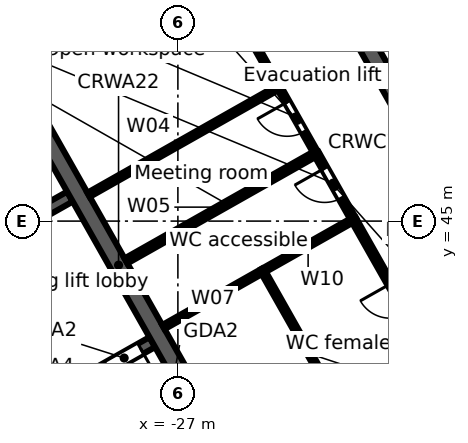
"""IFC4 building model, lengths in metres.
Left out: names, types, materials, properties, quantities, classifications, styles, units other than length and angle.
Written with IfcOpenShell. Run it as: python <this file> out.ifc"""

import sys

from ifc_helpers import new_model, si_unit, direction, frame, frame_2d, origin, place, context, subcontext, project, spatial, rectangle, extrude, element, fill, save


model = new_model("IFC4")
c1 = context("Model", 3, precision=1e-05, world=origin(), true_north=direction((0.0, 1.0)))
c2 = subcontext(c1, "Body", "Model", "MODEL_VIEW")
j1 = project(units=[si_unit("LENGTHUNIT", "METRE"), si_unit("PLANEANGLEUNIT", "RADIAN")], contexts=[c1])
p1 = place(None, origin())
s1 = spatial("IfcSite", under=j1, at=p1, CompositionType="ELEMENT")
p2 = place(p1, origin())
s2 = spatial("IfcBuilding", under=s1, at=p2, CompositionType="ELEMENT")
p3 = place(p2, frame((0.0, 0.0, 211.4)))
s3 = spatial("IfcBuildingStorey", under=s2, at=p3, CompositionType="ELEMENT", Elevation=211.4)
p4 = place(p3, frame((-0.046, 47.974, 0.0), z_axis=(0.0, 0.0, 1.0), x_axis=(-0.870356579543, -0.492421998337, 0.0)))
e1 = element("IfcWall", 1, at=p4, inside=s3, PredefinedType="STANDARD", context=c2, shape_type="SweptSolid", body=[
    extrude(rectangle(XDim=43.754, YDim=0.25, at=frame_2d((21.877, 0.0))), origin(), (0.0, 0.0, 1.0), 3.62),
])
p5 = place(p4, frame((41.061, 0.0, 0.8)))
e2 = element("IfcOpeningElement", 2, at=p5, cuts=e1, PredefinedType="OPENING", context=c2, shape_type="SweptSolid", body=[
    extrude(rectangle(XDim=2.4, YDim=2.2, at=frame_2d((1.2, 1.1))), frame((0.0, 0.135, 0.0), z_axis=(0.0, -1.0, 0.0), x_axis=(1.0, 0.0, 0.0)), (0.0, 0.0, 1.0), 0.27),
])
p6 = place(p4, frame((38.443, 0.0, 0.0)))
e3 = element("IfcOpeningElement", 3, at=p6, cuts=e1, PredefinedType="OPENING", context=c2, shape_type="SweptSolid", body=[
    extrude(rectangle(XDim=1.8, YDim=2.4, at=frame_2d((0.9, 1.2))), frame((0.0, 0.135, 0.0), z_axis=(0.0, -1.0, 0.0), x_axis=(1.0, 0.0, 0.0)), (0.0, 0.0, 1.0), 0.27),
])
p7 = place(p4, frame((35.225, 0.0, 0.8)))
e4 = element("IfcOpeningElement", 4, at=p7, cuts=e1, PredefinedType="OPENING", context=c2, shape_type="SweptSolid", body=[
    extrude(rectangle(XDim=2.4, YDim=2.2, at=frame_2d((1.2, 1.1))), frame((0.0, 0.135, 0.0), z_axis=(0.0, -1.0, 0.0), x_axis=(1.0, 0.0, 0.0)), (0.0, 0.0, 1.0), 0.27),
])
p8 = place(p4, frame((32.307, 0.0, 0.8)))
e5 = element("IfcOpeningElement", 5, at=p8, cuts=e1, PredefinedType="OPENING", context=c2, shape_type="SweptSolid", body=[
    extrude(rectangle(XDim=2.4, YDim=2.2, at=frame_2d((1.2, 1.1))), frame((0.0, 0.135, 0.0), z_axis=(0.0, -1.0, 0.0), x_axis=(1.0, 0.0, 0.0)), (0.0, 0.0, 1.0), 0.27),
])
p9 = place(p4, frame((29.688, 0.0, 0.0)))
e6 = element("IfcOpeningElement", 6, at=p9, cuts=e1, PredefinedType="OPENING", context=c2, shape_type="SweptSolid", body=[
    extrude(rectangle(XDim=1.8, YDim=2.4, at=frame_2d((0.9, 1.2))), frame((0.0, 0.135, 0.0), z_axis=(0.0, -1.0, 0.0), x_axis=(1.0, 0.0, 0.0)), (0.0, 0.0, 1.0), 0.27),
])
p10 = place(p4, frame((26.47, 0.0, 0.8)))
e7 = element("IfcOpeningElement", 7, at=p10, cuts=e1, PredefinedType="OPENING", context=c2, shape_type="SweptSolid", body=[
    extrude(rectangle(XDim=2.4, YDim=2.2, at=frame_2d((1.2, 1.1))), frame((0.0, 0.135, 0.0), z_axis=(0.0, -1.0, 0.0), x_axis=(1.0, 0.0, 0.0)), (0.0, 0.0, 1.0), 0.27),
])
p11 = place(p4, frame((23.552, 0.0, 0.8)))
e8 = element("IfcOpeningElement", 8, at=p11, cuts=e1, PredefinedType="OPENING", context=c2, shape_type="SweptSolid", body=[
    extrude(rectangle(XDim=2.4, YDim=2.2, at=frame_2d((1.2, 1.1))), frame((0.0, 0.135, 0.0), z_axis=(0.0, -1.0, 0.0), x_axis=(1.0, 0.0, 0.0)), (0.0, 0.0, 1.0), 0.27),
])
p12 = place(p4, frame((20.934, 0.0, 0.0)))
e9 = element("IfcOpeningElement", 9, at=p12, cuts=e1, PredefinedType="OPENING", context=c2, shape_type="SweptSolid", body=[
    extrude(rectangle(XDim=1.8, YDim=2.4, at=frame_2d((0.9, 1.2))), frame((0.0, 0.135, 0.0), z_axis=(0.0, -1.0, 0.0), x_axis=(1.0, 0.0, 0.0)), (0.0, 0.0, 1.0), 0.27),
])
p13 = place(p4, frame((17.716, 0.0, 0.8)))
e10 = element("IfcOpeningElement", 10, at=p13, cuts=e1, PredefinedType="OPENING", context=c2, shape_type="SweptSolid", body=[
    extrude(rectangle(XDim=2.4, YDim=2.2, at=frame_2d((1.2, 1.1))), frame((0.0, 0.135, 0.0), z_axis=(0.0, -1.0, 0.0), x_axis=(1.0, 0.0, 0.0)), (0.0, 0.0, 1.0), 0.27),
])
p14 = place(p4, frame((14.798, 0.0, 0.8)))
e11 = element("IfcOpeningElement", 11, at=p14, cuts=e1, PredefinedType="OPENING", context=c2, shape_type="SweptSolid", body=[
    extrude(rectangle(XDim=2.4, YDim=2.2, at=frame_2d((1.2, 1.1))), frame((0.0, 0.135, 0.0), z_axis=(0.0, -1.0, 0.0), x_axis=(1.0, 0.0, 0.0)), (0.0, 0.0, 1.0), 0.27),
])
p15 = place(p4, frame((12.179, 0.0, 0.0)))
e12 = element("IfcOpeningElement", 12, at=p15, cuts=e1, PredefinedType="OPENING", context=c2, shape_type="SweptSolid", body=[
    extrude(rectangle(XDim=1.8, YDim=2.4, at=frame_2d((0.9, 1.2))), frame((0.0, 0.135, 0.0), z_axis=(0.0, -1.0, 0.0), x_axis=(1.0, 0.0, 0.0)), (0.0, 0.0, 1.0), 0.27),
])
p16 = place(p4, frame((8.961, 0.0, 0.8)))
e13 = element("IfcOpeningElement", 13, at=p16, cuts=e1, PredefinedType="OPENING", context=c2, shape_type="SweptSolid", body=[
    extrude(rectangle(XDim=2.4, YDim=2.2, at=frame_2d((1.2, 1.1))), frame((0.0, 0.135, 0.0), z_axis=(0.0, -1.0, 0.0), x_axis=(1.0, 0.0, 0.0)), (0.0, 0.0, 1.0), 0.27),
])
p17 = place(p4, frame((6.043, 0.0, 0.8)))
e14 = element("IfcOpeningElement", 14, at=p17, cuts=e1, PredefinedType="OPENING", context=c2, shape_type="SweptSolid", body=[
    extrude(rectangle(XDim=2.4, YDim=2.2, at=frame_2d((1.2, 1.1))), frame((0.0, 0.135, 0.0), z_axis=(0.0, -1.0, 0.0), x_axis=(1.0, 0.0, 0.0)), (0.0, 0.0, 1.0), 0.27),
])
p18 = place(p4, frame((3.425, 0.0, 0.0)))
e15 = element("IfcOpeningElement", 15, at=p18, cuts=e1, PredefinedType="OPENING", context=c2, shape_type="SweptSolid", body=[
    extrude(rectangle(XDim=1.8, YDim=2.4, at=frame_2d((0.9, 1.2))), frame((0.0, 0.135, 0.0), z_axis=(0.0, -1.0, 0.0), x_axis=(1.0, 0.0, 0.0)), (0.0, 0.0, 1.0), 0.27),
])
p19 = place(p4, frame((0.207, 0.0, 0.8)))
e16 = element("IfcOpeningElement", 16, at=p19, cuts=e1, PredefinedType="OPENING", context=c2, shape_type="SweptSolid", body=[
    extrude(rectangle(XDim=2.4, YDim=2.2, at=frame_2d((1.2, 1.1))), frame((0.0, 0.135, 0.0), z_axis=(0.0, -1.0, 0.0), x_axis=(1.0, 0.0, 0.0)), (0.0, 0.0, 1.0), 0.27),
])
p20 = place(p3, frame((-58.732, 38.771, 0.0), z_axis=(0.0, 0.0, 1.0), x_axis=(0.870354824205, 0.492425100887, 0.0)))
e17 = element("IfcWall", 17, at=p20, inside=s3, PredefinedType="STANDARD", context=c2, shape_type="SweptSolid", body=[
    extrude(rectangle(XDim=64.006, YDim=0.25, at=frame_2d((32.003, 0.0))), origin(), (0.0, 0.0, 1.0), 3.62),
])
p21 = place(p20, frame((61.259, 0.0, 0.8)))
e18 = element("IfcOpeningElement", 18, at=p21, cuts=e17, PredefinedType="OPENING", context=c2, shape_type="SweptSolid", body=[
    extrude(rectangle(XDim=2.4, YDim=2.2, at=frame_2d((1.2, 1.1))), frame((0.0, 0.135, 0.0), z_axis=(0.0, -1.0, 0.0), x_axis=(1.0, 0.0, 0.0)), (0.0, 0.0, 1.0), 0.27),
])
p22 = place(p20, frame((58.216, 0.0, 0.8)))
e19 = element("IfcOpeningElement", 19, at=p22, cuts=e17, PredefinedType="OPENING", context=c2, shape_type="SweptSolid", body=[
    extrude(rectangle(XDim=2.4, YDim=2.2, at=frame_2d((1.2, 1.1))), frame((0.0, 0.135, 0.0), z_axis=(0.0, -1.0, 0.0), x_axis=(1.0, 0.0, 0.0)), (0.0, 0.0, 1.0), 0.27),
])
p23 = place(p20, frame((55.173, 0.0, 0.8)))
e20 = element("IfcOpeningElement", 20, at=p23, cuts=e17, PredefinedType="OPENING", context=c2, shape_type="SweptSolid", body=[
    extrude(rectangle(XDim=2.4, YDim=2.2, at=frame_2d((1.2, 1.1))), frame((0.0, 0.135, 0.0), z_axis=(0.0, -1.0, 0.0), x_axis=(1.0, 0.0, 0.0)), (0.0, 0.0, 1.0), 0.27),
])
p24 = place(p20, frame((52.129, 0.0, 0.8)))
e21 = element("IfcOpeningElement", 21, at=p24, cuts=e17, PredefinedType="OPENING", context=c2, shape_type="SweptSolid", body=[
    extrude(rectangle(XDim=2.4, YDim=2.2, at=frame_2d((1.2, 1.1))), frame((0.0, 0.135, 0.0), z_axis=(0.0, -1.0, 0.0), x_axis=(1.0, 0.0, 0.0)), (0.0, 0.0, 1.0), 0.27),
])
p25 = place(p20, frame((49.086, 0.0, 0.8)))
e22 = element("IfcOpeningElement", 22, at=p25, cuts=e17, PredefinedType="OPENING", context=c2, shape_type="SweptSolid", body=[
    extrude(rectangle(XDim=2.4, YDim=2.2, at=frame_2d((1.2, 1.1))), frame((0.0, 0.135, 0.0), z_axis=(0.0, -1.0, 0.0), x_axis=(1.0, 0.0, 0.0)), (0.0, 0.0, 1.0), 0.27),
])
p26 = place(p20, frame((46.043, 0.0, 0.8)))
e23 = element("IfcOpeningElement", 23, at=p26, cuts=e17, PredefinedType="OPENING", context=c2, shape_type="SweptSolid", body=[
    extrude(rectangle(XDim=2.4, YDim=2.2, at=frame_2d((1.2, 1.1))), frame((0.0, 0.135, 0.0), z_axis=(0.0, -1.0, 0.0), x_axis=(1.0, 0.0, 0.0)), (0.0, 0.0, 1.0), 0.27),
])
p27 = place(p20, frame((43.0, 0.0, 0.8)))
e24 = element("IfcOpeningElement", 24, at=p27, cuts=e17, PredefinedType="OPENING", context=c2, shape_type="SweptSolid", body=[
    extrude(rectangle(XDim=2.4, YDim=2.2, at=frame_2d((1.2, 1.1))), frame((0.0, 0.135, 0.0), z_axis=(0.0, -1.0, 0.0), x_axis=(1.0, 0.0, 0.0)), (0.0, 0.0, 1.0), 0.27),
])
p28 = place(p20, frame((39.956, 0.0, 0.8)))
e25 = element("IfcOpeningElement", 25, at=p28, cuts=e17, PredefinedType="OPENING", context=c2, shape_type="SweptSolid", body=[
    extrude(rectangle(XDim=2.4, YDim=2.2, at=frame_2d((1.2, 1.1))), frame((0.0, 0.135, 0.0), z_axis=(0.0, -1.0, 0.0), x_axis=(1.0, 0.0, 0.0)), (0.0, 0.0, 1.0), 0.27),
])
p29 = place(p20, frame((36.913, 0.0, 0.8)))
e26 = element("IfcOpeningElement", 26, at=p29, cuts=e17, PredefinedType="OPENING", context=c2, shape_type="SweptSolid", body=[
    extrude(rectangle(XDim=2.4, YDim=2.2, at=frame_2d((1.2, 1.1))), frame((0.0, 0.135, 0.0), z_axis=(0.0, -1.0, 0.0), x_axis=(1.0, 0.0, 0.0)), (0.0, 0.0, 1.0), 0.27),
])
p30 = place(p20, frame((33.87, 0.0, 0.8)))
e27 = element("IfcOpeningElement", 27, at=p30, cuts=e17, PredefinedType="OPENING", context=c2, shape_type="SweptSolid", body=[
    extrude(rectangle(XDim=2.4, YDim=2.2, at=frame_2d((1.2, 1.1))), frame((0.0, 0.135, 0.0), z_axis=(0.0, -1.0, 0.0), x_axis=(1.0, 0.0, 0.0)), (0.0, 0.0, 1.0), 0.27),
])
p31 = place(p20, frame((30.826, 0.0, 0.8)))
e28 = element("IfcOpeningElement", 28, at=p31, cuts=e17, PredefinedType="OPENING", context=c2, shape_type="SweptSolid", body=[
    extrude(rectangle(XDim=2.4, YDim=2.2, at=frame_2d((1.2, 1.1))), frame((0.0, 0.135, 0.0), z_axis=(0.0, -1.0, 0.0), x_axis=(1.0, 0.0, 0.0)), (0.0, 0.0, 1.0), 0.27),
])
p32 = place(p20, frame((27.783, 0.0, 0.8)))
e29 = element("IfcOpeningElement", 29, at=p32, cuts=e17, PredefinedType="OPENING", context=c2, shape_type="SweptSolid", body=[
    extrude(rectangle(XDim=2.4, YDim=2.2, at=frame_2d((1.2, 1.1))), frame((0.0, 0.135, 0.0), z_axis=(0.0, -1.0, 0.0), x_axis=(1.0, 0.0, 0.0)), (0.0, 0.0, 1.0), 0.27),
])
p33 = place(p20, frame((24.74, 0.0, 0.8)))
e30 = element("IfcOpeningElement", 30, at=p33, cuts=e17, PredefinedType="OPENING", context=c2, shape_type="SweptSolid", body=[
    extrude(rectangle(XDim=2.4, YDim=2.2, at=frame_2d((1.2, 1.1))), frame((0.0, 0.135, 0.0), z_axis=(0.0, -1.0, 0.0), x_axis=(1.0, 0.0, 0.0)), (0.0, 0.0, 1.0), 0.27),
])
p34 = place(p20, frame((21.696, 0.0, 0.8)))
e31 = element("IfcOpeningElement", 31, at=p34, cuts=e17, PredefinedType="OPENING", context=c2, shape_type="SweptSolid", body=[
    extrude(rectangle(XDim=2.4, YDim=2.2, at=frame_2d((1.2, 1.1))), frame((0.0, 0.135, 0.0), z_axis=(0.0, -1.0, 0.0), x_axis=(1.0, 0.0, 0.0)), (0.0, 0.0, 1.0), 0.27),
])
p35 = place(p20, frame((18.653, 0.0, 0.8)))
e32 = element("IfcOpeningElement", 32, at=p35, cuts=e17, PredefinedType="OPENING", context=c2, shape_type="SweptSolid", body=[
    extrude(rectangle(XDim=2.4, YDim=2.2, at=frame_2d((1.2, 1.1))), frame((0.0, 0.135, 0.0), z_axis=(0.0, -1.0, 0.0), x_axis=(1.0, 0.0, 0.0)), (0.0, 0.0, 1.0), 0.27),
])
p36 = place(p20, frame((15.61, 0.0, 0.8)))
e33 = element("IfcOpeningElement", 33, at=p36, cuts=e17, PredefinedType="OPENING", context=c2, shape_type="SweptSolid", body=[
    extrude(rectangle(XDim=2.4, YDim=2.2, at=frame_2d((1.2, 1.1))), frame((0.0, 0.135, 0.0), z_axis=(0.0, -1.0, 0.0), x_axis=(1.0, 0.0, 0.0)), (0.0, 0.0, 1.0), 0.27),
])
p37 = place(p20, frame((12.567, 0.0, 0.8)))
e34 = element("IfcOpeningElement", 34, at=p37, cuts=e17, PredefinedType="OPENING", context=c2, shape_type="SweptSolid", body=[
    extrude(rectangle(XDim=2.4, YDim=2.2, at=frame_2d((1.2, 1.1))), frame((0.0, 0.135, 0.0), z_axis=(0.0, -1.0, 0.0), x_axis=(1.0, 0.0, 0.0)), (0.0, 0.0, 1.0), 0.27),
])
p38 = place(p20, frame((9.523, 0.0, 0.8)))
e35 = element("IfcOpeningElement", 35, at=p38, cuts=e17, PredefinedType="OPENING", context=c2, shape_type="SweptSolid", body=[
    extrude(rectangle(XDim=2.4, YDim=2.2, at=frame_2d((1.2, 1.1))), frame((0.0, 0.135, 0.0), z_axis=(0.0, -1.0, 0.0), x_axis=(1.0, 0.0, 0.0)), (0.0, 0.0, 1.0), 0.27),
])
p39 = place(p20, frame((6.48, 0.0, 0.8)))
e36 = element("IfcOpeningElement", 36, at=p39, cuts=e17, PredefinedType="OPENING", context=c2, shape_type="SweptSolid", body=[
    extrude(rectangle(XDim=2.4, YDim=2.2, at=frame_2d((1.2, 1.1))), frame((0.0, 0.135, 0.0), z_axis=(0.0, -1.0, 0.0), x_axis=(1.0, 0.0, 0.0)), (0.0, 0.0, 1.0), 0.27),
])
p40 = place(p20, frame((3.437, 0.0, 0.8)))
e37 = element("IfcOpeningElement", 37, at=p40, cuts=e17, PredefinedType="OPENING", context=c2, shape_type="SweptSolid", body=[
    extrude(rectangle(XDim=2.4, YDim=2.2, at=frame_2d((1.2, 1.1))), frame((0.0, 0.135, 0.0), z_axis=(0.0, -1.0, 0.0), x_axis=(1.0, 0.0, 0.0)), (0.0, 0.0, 1.0), 0.27),
])
p41 = place(p20, frame((0.393, 0.0, 0.8)))
e38 = element("IfcOpeningElement", 38, at=p41, cuts=e17, PredefinedType="OPENING", context=c2, shape_type="SweptSolid", body=[
    extrude(rectangle(XDim=2.4, YDim=2.2, at=frame_2d((1.2, 1.1))), frame((0.0, 0.135, 0.0), z_axis=(0.0, -1.0, 0.0), x_axis=(1.0, 0.0, 0.0)), (0.0, 0.0, 1.0), 0.27),
])
p42 = place(p3, frame((-34.245, 38.097, 0.0), z_axis=(0.0, 0.0, 1.0), x_axis=(0.870360409231, 0.492415229297, 0.0)))
e39 = element("IfcWall", 39, at=p42, inside=s3, PredefinedType="SOLIDWALL", context=c2, shape_type="SweptSolid", body=[
    extrude(rectangle(XDim=7.55, YDim=0.3, at=frame_2d((3.775, 0.0))), origin(), (0.0, 0.0, 1.0), 3.62),
])
p43 = place(p42, frame((6.2, 0.0, 0.0)))
e40 = element("IfcOpeningElement", 40, at=p43, cuts=e39, PredefinedType="OPENING", context=c2, shape_type="SweptSolid", body=[
    extrude(rectangle(XDim=1.0, YDim=2.1, at=frame_2d((0.5, 1.05))), frame((0.0, 0.16, 0.0), z_axis=(0.0, -1.0, 0.0), x_axis=(1.0, 0.0, 0.0)), (0.0, 0.0, 1.0), 0.32),
])
p44 = place(p3, frame((-37.282, 41.435, 0.0), z_axis=(0.0, 0.0, 1.0), x_axis=(0.870352688754, 0.492428875248, 0.0)))
e41 = element("IfcWall", 41, at=p44, inside=s3, PredefinedType="SOLIDWALL", context=c2, shape_type="SweptSolid", body=[
    extrude(rectangle(XDim=8.55, YDim=0.3, at=frame_2d((4.275, 0.0))), origin(), (0.0, 0.0, 1.0), 3.62),
])
p45 = place(p44, frame((6.2, 0.0, 0.0)))
e42 = element("IfcOpeningElement", 42, at=p45, cuts=e41, PredefinedType="OPENING", context=c2, shape_type="SweptSolid", body=[
    extrude(rectangle(XDim=1.1, YDim=2.1, at=frame_2d((0.55, 1.05))), frame((0.0, 0.16, 0.0), z_axis=(0.0, -1.0, 0.0), x_axis=(1.0, 0.0, 0.0)), (0.0, 0.0, 1.0), 0.32),
])
p46 = place(p44, frame((2.35, 0.0, 0.0)))
e43 = element("IfcOpeningElement", 43, at=p46, cuts=e41, PredefinedType="OPENING", context=c2, shape_type="SweptSolid", body=[
    extrude(rectangle(XDim=0.9, YDim=2.1, at=frame_2d((0.45, 1.05))), frame((0.0, 0.16, 0.0), z_axis=(0.0, -1.0, 0.0), x_axis=(1.0, 0.0, 0.0)), (0.0, 0.0, 1.0), 0.32),
])
p47 = place(p3, frame((-31.787, 49.542, 0.0), z_axis=(0.0, 0.0, 1.0), x_axis=(0.492421378713, -0.870356930107, 0.0)))
e44 = element("IfcWall", 44, at=p47, inside=s3, PredefinedType="SOLIDWALL", context=c2, shape_type="SweptSolid", body=[
    extrude(rectangle(XDim=13.1, YDim=0.45, at=frame_2d((6.55, 0.0))), origin(), (0.0, 0.0, 1.0), 3.62),
])
p48 = place(p3, frame((-24.353, 53.747, 0.0), z_axis=(0.0, 0.0, 1.0), x_axis=(0.492435496286, -0.870348942665, 0.0)))
e45 = element("IfcWall", 45, at=p48, inside=s3, PredefinedType="SOLIDWALL", context=c2, shape_type="SweptSolid", body=[
    extrude(rectangle(XDim=13.1, YDim=0.45, at=frame_2d((6.55, 0.0))), origin(), (0.0, 0.0, 1.0), 3.62),
])
p49 = place(p3, frame((-29.35, 45.692, 0.0), z_axis=(0.0, 0.0, 1.0), x_axis=(0.870294630003, 0.492531478169, 0.0)))
e46 = element("IfcWall", 46, at=p49, inside=s3, PredefinedType="PARTITIONING", context=c2, shape_type="SweptSolid", body=[
    extrude(rectangle(XDim=5.75, YDim=0.125, at=frame_2d((2.875, 0.0))), origin(), (0.0, 0.0, 1.0), 3.62),
])
p50 = place(p3, frame((-28.366, 43.952, 0.0), z_axis=(0.0, 0.0, 1.0), x_axis=(0.870398309195, 0.492348233825, 0.0)))
e47 = element("IfcWall", 47, at=p50, inside=s3, PredefinedType="PARTITIONING", context=c2, shape_type="SweptSolid", body=[
    extrude(rectangle(XDim=5.75, YDim=0.15, at=frame_2d((2.875, 0.0))), origin(), (0.0, 0.0, 1.0), 2.892),
])
p51 = place(p3, frame((-27.381, 42.211, 0.0), z_axis=(0.0, 0.0, 1.0), x_axis=(0.870388475779, 0.492365617434, 0.0)))
e48 = element("IfcWall", 48, at=p51, inside=s3, PredefinedType="PARTITIONING", context=c2, shape_type="SweptSolid", body=[
    extrude(rectangle(XDim=3.0, YDim=0.125, at=frame_2d((1.5, 0.0))), origin(), (0.0, 0.0, 1.0), 2.892),
])
p52 = place(p3, frame((-26.808, 52.876, 0.0), z_axis=(0.0, 0.0, 1.0), x_axis=(0.492406341242, -0.870365437678, 0.0)))
e49 = element("IfcWall", 49, at=p52, inside=s3, PredefinedType="PARTITIONING", context=c2, shape_type="SweptSolid", body=[
    extrude(rectangle(XDim=5.0, YDim=0.125, at=frame_2d((2.5, 0.0))), origin(), (0.0, 0.0, 1.0), 3.62),
])
p53 = place(p52, frame((1.95, 0.0, 0.0)))
e50 = element("IfcOpeningElement", 50, at=p53, cuts=e49, PredefinedType="OPENING", context=c2, shape_type="SweptSolid", body=[
    extrude(rectangle(XDim=0.9, YDim=2.1, at=frame_2d((0.45, 1.05))), frame((0.0, 0.073, 0.0), z_axis=(0.0, -1.0, 0.0), x_axis=(1.0, 0.0, 0.0)), (0.0, 0.0, 1.0), 0.145),
])
p54 = place(p3, frame((-24.77, 43.688, 0.0), z_axis=(0.0, 0.0, 1.0), x_axis=(0.870430549821, 0.492291232848, 0.0)))
e51 = element("IfcWall", 51, at=p54, inside=s3, PredefinedType="PARTITIONING", context=c2, shape_type="SweptSolid", body=[
    extrude(rectangle(XDim=2.75, YDim=0.125, at=frame_2d((1.375, 0.0))), origin(), (0.0, 0.0, 1.0), 3.62),
])
p55 = place(p3, frame((-24.77, 43.688, 0.0), z_axis=(0.0, 0.0, 1.0), x_axis=(0.492369352746, -0.870386362759, 0.0)))
e52 = element("IfcWall", 52, at=p55, inside=s3, PredefinedType="PARTITIONING", context=c2, shape_type="SweptSolid", body=[
    extrude(rectangle(XDim=5.0, YDim=0.125, at=frame_2d((2.5, 0.0))), origin(), (0.0, 0.0, 1.0), 3.62),
])
p56 = place(p3, frame((-24.346, 48.524, 0.0), z_axis=(0.0, 0.0, 1.0), x_axis=(0.492374954878, -0.870383193662, 0.0)))
e53 = element("IfcWall", 53, at=p56, inside=s3, PredefinedType="PARTITIONING", context=c2, shape_type="SweptSolid", body=[
    extrude(rectangle(XDim=2.0, YDim=0.125, at=frame_2d((1.0, 0.0))), origin(), (0.0, 0.0, 1.0), 2.892),
])
p57 = place(p56, frame((0.45, 0.0, 0.0)))
e54 = element("IfcOpeningElement", 54, at=p57, cuts=e53, PredefinedType="OPENING", context=c2, shape_type="SweptSolid", body=[
    extrude(rectangle(XDim=0.9, YDim=2.1, at=frame_2d((0.45, 1.05))), frame((0.0, 0.073, 0.0), z_axis=(0.0, -1.0, 0.0), x_axis=(1.0, 0.0, 0.0)), (0.0, 0.0, 1.0), 0.145),
])
p58 = place(p3, frame((-23.361, 46.783, 0.0), z_axis=(0.0, 0.0, 1.0), x_axis=(0.492467412326, -0.870330884088, 0.0)))
e55 = element("IfcWall", 55, at=p58, inside=s3, PredefinedType="PARTITIONING", context=c2, shape_type="SweptSolid", body=[
    extrude(rectangle(XDim=2.0, YDim=0.15, at=frame_2d((1.0, 0.0))), origin(), (0.0, 0.0, 1.0), 2.892),
])
p59 = place(p58, frame((0.45, 0.0, 0.0)))
e56 = element("IfcOpeningElement", 56, at=p59, cuts=e55, PredefinedType="OPENING", context=c2, shape_type="SweptSolid", body=[
    extrude(rectangle(XDim=0.9, YDim=2.1, at=frame_2d((0.45, 1.05))), frame((0.0, 0.085, 0.0), z_axis=(0.0, -1.0, 0.0), x_axis=(1.0, 0.0, 0.0)), (0.0, 0.0, 1.0), 0.17),
])
p60 = place(p3, frame((-22.376, 45.042, 0.0), z_axis=(0.0, 0.0, 1.0), x_axis=(0.49245306389, -0.870339002841, 0.0)))
e57 = element("IfcWall", 57, at=p60, inside=s3, PredefinedType="PARTITIONING", context=c2, shape_type="SweptSolid", body=[
    extrude(rectangle(XDim=4.999, YDim=0.15, at=frame_2d((2.5, 0.0))), origin(), (0.0, 0.0, 1.0), 3.62),
])
p61 = place(p60, frame((1.95, 0.0, 0.0)))
e58 = element("IfcOpeningElement", 58, at=p61, cuts=e57, PredefinedType="OPENING", context=c2, shape_type="SweptSolid", body=[
    extrude(rectangle(XDim=0.9, YDim=2.1, at=frame_2d((0.45, 1.05))), frame((0.0, 0.085, 0.0), z_axis=(0.0, -1.0, 0.0), x_axis=(1.0, 0.0, 0.0)), (0.0, 0.0, 1.0), 0.17),
])
p62 = place(p43, frame((1.0, 0.0, 0.0), z_axis=(0.0, 0.0, 1.0), x_axis=(-1.0, 0.0, 0.0)))
e59 = element("IfcDoor", 59, at=p62, inside=s3, OperationType="SINGLE_SWING_LEFT", PredefinedType="DOOR", context=c2, shape_type="SweptSolid", body=[
    extrude(rectangle(XDim=1.0, YDim=2.1, at=frame_2d((0.5, 1.05))), frame((0.0, 0.025, 0.0), z_axis=(0.0, -1.0, 0.0), x_axis=(1.0, 0.0, 0.0)), (0.0, 0.0, 1.0), 0.05),
])
fill(e40, e59)
p63 = place(p59, frame((0.9, 0.0, 0.0), z_axis=(0.0, 0.0, 1.0), x_axis=(-1.0, 0.0, 0.0)))
e60 = element("IfcDoor", 60, at=p63, inside=s3, OperationType="SINGLE_SWING_RIGHT", PredefinedType="DOOR", context=c2, shape_type="SweptSolid", body=[
    extrude(rectangle(XDim=0.9, YDim=2.1, at=frame_2d((0.45, 1.05))), frame((0.0, 0.025, 0.0), z_axis=(0.0, -1.0, 0.0), x_axis=(1.0, 0.0, 0.0)), (0.0, 0.0, 1.0), 0.05),
])
fill(e56, e60)
p64 = place(p57, frame((0.9, 0.0, 0.0), z_axis=(0.0, 0.0, 1.0), x_axis=(-1.0, 0.0, 0.0)))
e61 = element("IfcDoor", 61, at=p64, inside=s3, OperationType="SINGLE_SWING_RIGHT", PredefinedType="DOOR", context=c2, shape_type="SweptSolid", body=[
    extrude(rectangle(XDim=0.9, YDim=2.1, at=frame_2d((0.45, 1.05))), frame((0.0, 0.025, 0.0), z_axis=(0.0, -1.0, 0.0), x_axis=(1.0, 0.0, 0.0)), (0.0, 0.0, 1.0), 0.05),
])
fill(e54, e61)
save(model, sys.argv[1])
